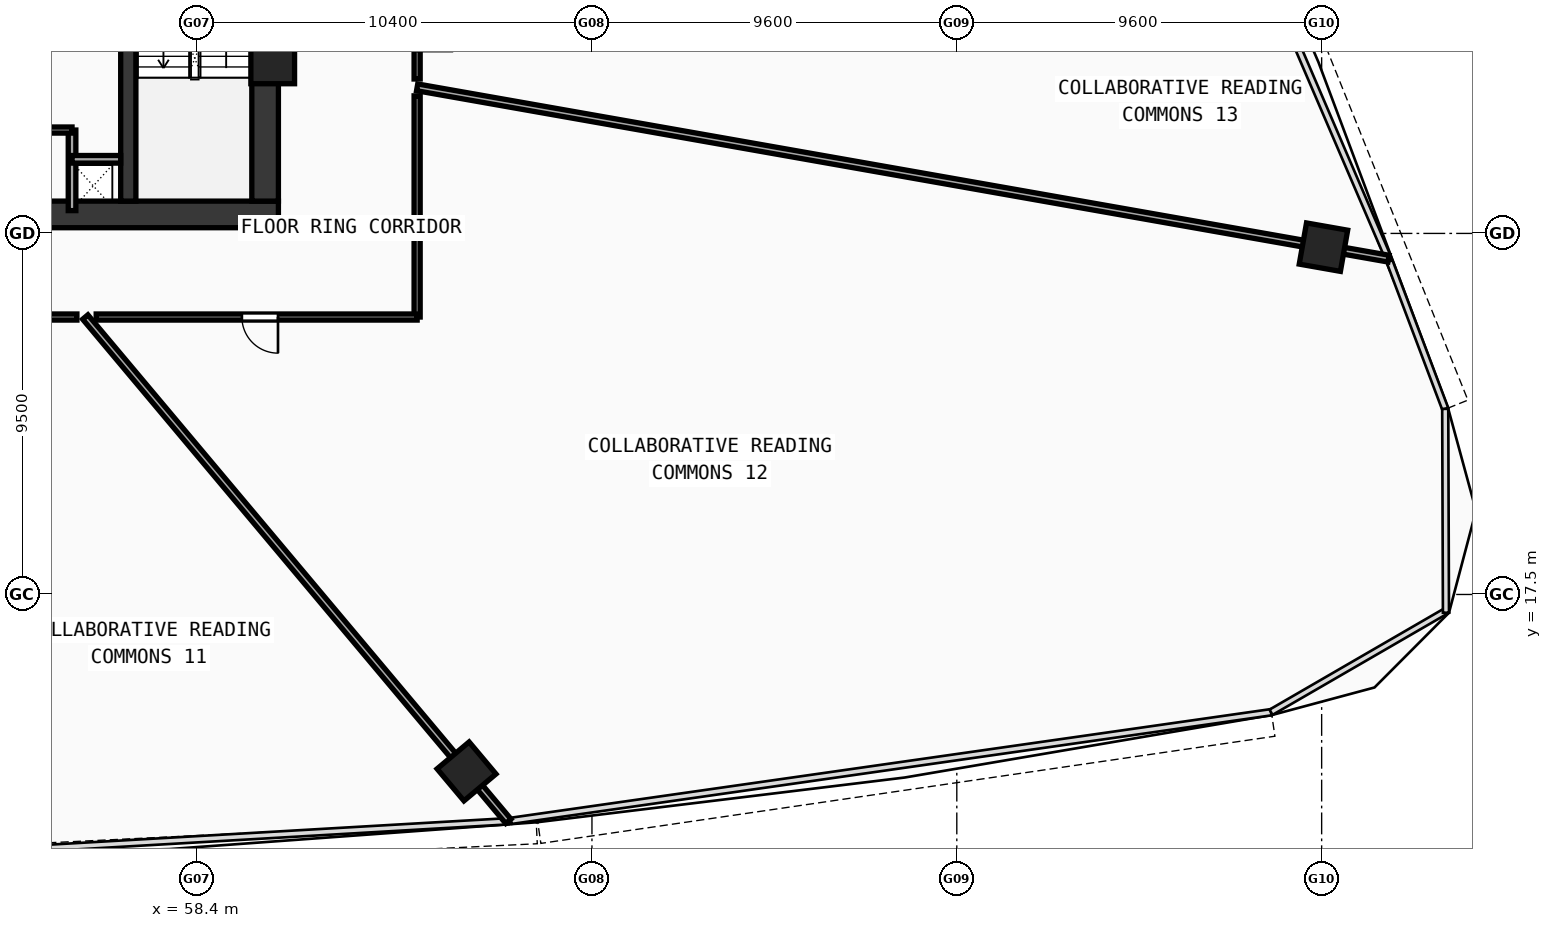
"""IFC4 building model, lengths in metres.
Left out: names, types, materials, properties, quantities, classifications, styles, units other than length and angle.
Written with IfcOpenShell. Run it as: python <this file> out.ifc"""

import sys

from ifc_helpers import new_model, si_unit, direction, frame, frame_2d, origin, origin_with_axes, origin_2d, place, context, subcontext, project, spatial, rectangle, hollow_rectangle, extrude, source, transform, mapped, element, fill, save


model = new_model("IFC4")
c1 = context("Model", 3, precision=1e-05, world=origin(), true_north=direction((0.0, 1.0)))
c2 = subcontext(c1, "Body", "Model", "MODEL_VIEW")
j1 = project(units=[si_unit("LENGTHUNIT", "METRE"), si_unit("PLANEANGLEUNIT", "RADIAN")], contexts=[c1])
p1 = place(None, origin())
s1 = spatial("IfcSite", under=j1, at=p1, CompositionType="ELEMENT")
p2 = place(p1, origin())
s2 = spatial("IfcBuilding", under=s1, at=p2, CompositionType="ELEMENT")
p3 = place(p2, frame((0.0, 0.0, 44.92)))
s3 = spatial("IfcBuildingStorey", under=s2, at=p3, CompositionType="ELEMENT", Elevation=44.92)
p4 = place(p3, frame((35.45, 27.5, 0.0), z_axis=(0.0, 0.0, 1.0), x_axis=(1.0, 0.0, 0.0)))
e1 = element("IfcWall", 1, at=p4, inside=s3, PredefinedType="SHEAR", context=c2, shape_type="SweptSolid", body=[
    extrude(rectangle(XDim=25.1, YDim=0.7, at=frame_2d((12.55, 0.0))), origin(), (0.0, 0.0, 1.0), 3.37),
])
p5 = place(p3, frame((60.2, 27.85, 0.0), z_axis=(0.0, 0.0, 1.0), x_axis=(0.0, 1.0, 0.0)))
e2 = element("IfcWall", 2, at=p5, inside=s3, PredefinedType="SHEAR", context=c2, shape_type="SweptSolid", body=[
    extrude(rectangle(XDim=12.0, YDim=0.7, at=frame_2d((6.0, 0.0))), origin(), (0.0, 0.0, 1.0), 3.37),
])
p6 = place(p3, frame((56.6, 27.85, 0.0), z_axis=(0.0, 0.0, 1.0), x_axis=(0.0, 1.0, 0.0)))
e3 = element("IfcWall", 3, at=p6, inside=s3, PredefinedType="SHEAR", context=c2, shape_type="SweptSolid", body=[
    extrude(rectangle(XDim=12.0, YDim=0.4, at=frame_2d((6.0, 0.0))), origin(), (0.0, 0.0, 1.0), 3.37),
])
p7 = place(p6, frame((9.9, 0.0, 0.0)))
e4 = element("IfcOpeningElement", 4, at=p7, cuts=e3, PredefinedType="OPENING", context=c2, shape_type="SweptSolid", body=[
    extrude(rectangle(XDim=1.1, YDim=2.1, at=frame_2d((0.55, 1.05))), frame((0.0, 0.21, 0.0), z_axis=(0.0, -1.0, 0.0), x_axis=(1.0, 0.0, 0.0)), (0.0, 0.0, 1.0), 0.42),
])
m1 = source(origin(), c2, "Body", "SweptSolid", [
    extrude(hollow_rectangle(XDim=1.15, YDim=1.15, WallThickness=0.048, at=origin_2d()), origin(), (0.0, 0.0, 1.0), 3.63),
])
p8 = place(p3, frame((60.4, 31.513, -0.26), z_axis=(0.0, 0.0, 1.0), x_axis=(1.0, 0.0, 0.0)))
e5 = element("IfcColumn", 5, at=p8, inside=s3, PredefinedType="COLUMN", context=c2, shape_type="MappedRepresentation", body=[
    mapped(m1, transform((0.0, 0.0, 0.0), scale=1.0)),
])
m2 = source(origin(), c2, "Body", "SweptSolid", [
    extrude(hollow_rectangle(XDim=1.1, YDim=1.1, WallThickness=0.045, at=origin_2d()), origin(), (0.0, 0.0, 1.0), 3.63),
])
for number, where, z_axis, x_axis in (
    (6, (65.5, 12.844, -0.26), (0.0, 0.0, 1.0), (0.766, 0.643, 0.0)),
    (7, (88.048, 26.638, -0.26), (0.0, 0.0, 1.0), (0.174, 0.985, 0.0)),
):
    element("IfcColumn", number, at=place(p3, frame(where, z_axis=z_axis, x_axis=x_axis)), inside=s3, PredefinedType="COLUMN", context=c2, shape_type="MappedRepresentation", body=[
        mapped(m2, transform((0.0, 0.0, 0.0), scale=1.0)),
    ])
p9 = place(p3, frame((55.12, 27.6, 0.0), z_axis=(0.0, 0.0, 1.0), x_axis=(0.0, 1.0, 0.0)))
e8 = element("IfcWall", 8, at=p9, inside=s3, PredefinedType="SOLIDWALL", context=c2, shape_type="SweptSolid", body=[
    extrude(rectangle(XDim=2.12, YDim=0.2, at=frame_2d((1.06, 0.0))), origin(), (0.0, 0.0, 1.0), 3.37),
])
p10 = place(p3, frame((55.12, 28.95, 0.0), z_axis=(0.0, 0.0, 1.0), x_axis=(1.0, 0.0, 0.0)))
e9 = element("IfcWall", 9, at=p10, inside=s3, PredefinedType="SOLIDWALL", context=c2, shape_type="SweptSolid", body=[
    extrude(rectangle(XDim=1.28, YDim=0.2, at=frame_2d((0.64, 0.0))), origin(), (0.0, 0.0, 1.0), 3.37),
])
p11 = place(p3, frame((51.05, 29.72, 0.0), z_axis=(0.0, 0.0, 1.0), x_axis=(1.0, 0.0, 0.0)))
e10 = element("IfcWall", 10, at=p11, inside=s3, PredefinedType="PARTITIONING", context=c2, shape_type="SweptSolid", body=[
    extrude(rectangle(XDim=4.07, YDim=0.16, at=frame_2d((2.035, 0.0))), origin(), (0.0, 0.0, 1.0), 3.37),
])
p12 = place(p11, frame((0.5, 0.0, 0.0)))
e11 = element("IfcOpeningElement", 11, at=p12, cuts=e10, PredefinedType="OPENING", context=c2, shape_type="SweptSolid", body=[
    extrude(rectangle(XDim=0.9, YDim=2.1, at=frame_2d((0.45, 1.05))), frame((0.0, 0.09, 0.0), z_axis=(0.0, -1.0, 0.0), x_axis=(1.0, 0.0, 0.0)), (0.0, 0.0, 1.0), 0.18),
])
p13 = place(p3, frame((55.468, 24.8, 0.0), z_axis=(0.0, 0.0, 1.0), x_axis=(0.642784696521, -0.766046887546, 0.0)))
e12 = element("IfcWall", 12, at=p13, inside=s3, PredefinedType="PARTITIONING", context=c2, shape_type="SweptSolid", body=[
    extrude(rectangle(XDim=17.319, YDim=0.18, at=frame_2d((8.659, 0.0))), origin(), (0.0, 0.0, 1.0), 2.67),
])
p14 = place(p3, frame((64.2, 30.844, 0.0), z_axis=(0.0, 0.0, 1.0), x_axis=(0.984807792045, -0.173647956302, 0.0)))
e13 = element("IfcWall", 13, at=p14, inside=s3, PredefinedType="PARTITIONING", context=c2, shape_type="SweptSolid", body=[
    extrude(rectangle(XDim=25.954, YDim=0.18, at=frame_2d((12.977, 0.0))), origin(), (0.0, 0.0, 1.0), 2.67),
])
p15 = place(p3, frame((64.2, 33.48, 0.0), z_axis=(0.0, 0.0, 1.0), x_axis=(0.0, -1.0, 0.0)))
e14 = element("IfcWall", 14, at=p15, inside=s3, PredefinedType="PARTITIONING", context=c2, shape_type="SweptSolid", body=[
    extrude(rectangle(XDim=2.417, YDim=0.16, at=frame_2d((1.208, 0.0))), origin(), (0.0, 0.0, 1.0), 3.37),
])
p16 = place(p15, frame((0.733, 0.0, 0.0)))
e15 = element("IfcOpeningElement", 15, at=p16, cuts=e14, PredefinedType="OPENING", context=c2, shape_type="SweptSolid", body=[
    extrude(rectangle(XDim=0.95, YDim=2.1, at=frame_2d((0.475, 1.05))), frame((0.0, 0.09, 0.0), z_axis=(0.0, -1.0, 0.0), x_axis=(1.0, 0.0, 0.0)), (0.0, 0.0, 1.0), 0.18),
])
p17 = place(p3, frame((64.2, 30.62, 0.0), z_axis=(0.0, 0.0, 1.0), x_axis=(0.0, -1.0, 0.0)))
e16 = element("IfcWall", 16, at=p17, inside=s3, PredefinedType="PARTITIONING", context=c2, shape_type="SweptSolid", body=[
    extrude(rectangle(XDim=5.82, YDim=0.16, at=frame_2d((2.91, 0.0))), origin(), (0.0, 0.0, 1.0), 2.97),
])
p18 = place(p3, frame((64.2, 24.8, 0.0), z_axis=(0.0, 0.0, 1.0), x_axis=(-1.0, 0.0, 0.0)))
e17 = element("IfcWall", 17, at=p18, inside=s3, PredefinedType="PARTITIONING", context=c2, shape_type="SweptSolid", body=[
    extrude(rectangle(XDim=8.445, YDim=0.16, at=frame_2d((4.222, 0.0))), origin(), (0.0, 0.0, 1.0), 2.97),
])
p19 = place(p18, frame((3.661, 0.0, 0.0)))
e18 = element("IfcOpeningElement", 18, at=p19, cuts=e17, PredefinedType="OPENING", context=c2, shape_type="SweptSolid", body=[
    extrude(rectangle(XDim=0.95, YDim=2.1, at=frame_2d((0.475, 1.05))), frame((0.0, 0.09, 0.0), z_axis=(0.0, -1.0, 0.0), x_axis=(1.0, 0.0, 0.0)), (0.0, 0.0, 1.0), 0.18),
])
p20 = place(p3, frame((55.248, 24.8, 0.0), z_axis=(0.0, 0.0, 1.0), x_axis=(-1.0, 0.0, 0.0)))
e19 = element("IfcWall", 19, at=p20, inside=s3, PredefinedType="PARTITIONING", context=c2, shape_type="SweptSolid", body=[
    extrude(rectangle(XDim=4.635, YDim=0.16, at=frame_2d((2.318, 0.0))), origin(), (0.0, 0.0, 1.0), 2.67),
])
p21 = place(p20, frame((1.847, 0.0, 0.0)))
e20 = element("IfcOpeningElement", 20, at=p21, cuts=e19, PredefinedType="OPENING", context=c2, shape_type="SweptSolid", body=[
    extrude(rectangle(XDim=0.95, YDim=2.1, at=frame_2d((0.475, 1.05))), frame((0.0, 0.09, 0.0), z_axis=(0.0, -1.0, 0.0), x_axis=(1.0, 0.0, 0.0)), (0.0, 0.0, 1.0), 0.18),
])
m3 = source(origin(), c2, "Body", "SweptSolid", [
    extrude(rectangle(XDim=0.95, YDim=2.1, at=frame_2d((0.475, 1.05))), frame((0.0, 0.025, 0.0), z_axis=(0.0, -1.0, 0.0), x_axis=(1.0, 0.0, 0.0)), (0.0, 0.0, 1.0), 0.05),
])
p22 = place(p19, origin_with_axes())
e21 = element("IfcDoor", 21, at=p22, inside=s3, OperationType="SINGLE_SWING_LEFT", PredefinedType="DOOR", context=c2, shape_type="MappedRepresentation", body=[
    mapped(m3, transform((0.0, 0.0, 0.0), scale=1.0)),
])
fill(e18, e21)
save(model, sys.argv[1])
